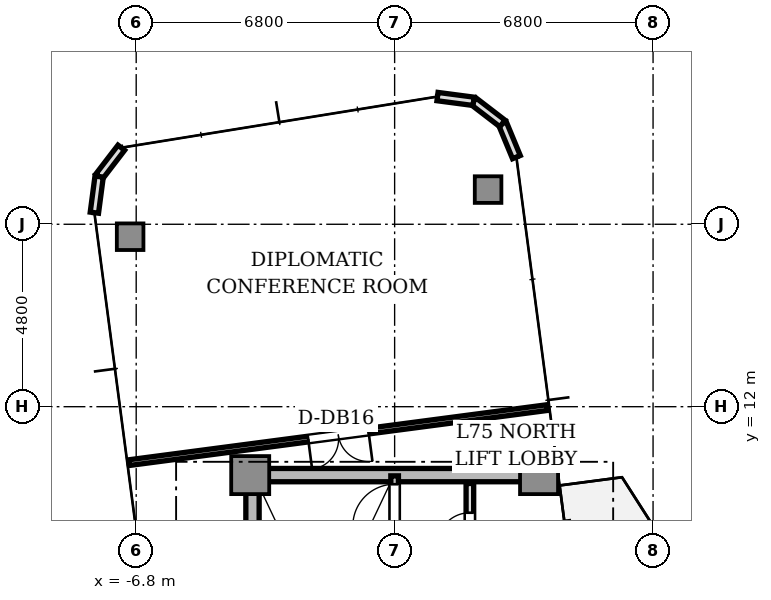
"""IFC4 building model, lengths in metres.
Left out: names, types, materials, properties, quantities, classifications, styles, units other than length and angle.
Written with IfcOpenShell. Run it as: python <this file> out.ifc"""

import sys

from ifc_helpers import new_model, si_unit, direction, frame, frame_2d, origin, origin_2d, place, context, subcontext, project, spatial, rectangle, extrude, source, transform, mapped, element, fill, save


model = new_model("IFC4")
c1 = context("Model", 3, precision=1e-05, world=origin(), true_north=direction((0.0, 1.0)))
c2 = subcontext(c1, "Body", "Model", "MODEL_VIEW")
j1 = project(units=[si_unit("LENGTHUNIT", "METRE"), si_unit("PLANEANGLEUNIT", "RADIAN")], contexts=[c1])
p1 = place(None, origin())
s1 = spatial("IfcSite", under=j1, at=p1, CompositionType="ELEMENT")
p2 = place(p1, origin())
s2 = spatial("IfcBuilding", under=s1, at=p2, CompositionType="ELEMENT")
p3 = place(p2, frame((0.0, 0.0, 269.1)))
s3 = spatial("IfcBuildingStorey", under=s2, at=p3, CompositionType="ELEMENT", Elevation=269.1)
p4 = place(p3, frame((-3.55, 10.2, 0.0), z_axis=(0.0, 0.0, 1.0), x_axis=(1.0, 0.0, 0.0)))
e1 = element("IfcWall", 1, at=p4, inside=s3, PredefinedType="SHEAR", context=c2, shape_type="SweptSolid", body=[
    extrude(rectangle(XDim=7.1, YDim=0.35, at=frame_2d((3.55, 0.0))), origin(), (0.0, 0.0, 1.0), 3.11),
])
p5 = place(p3, frame((-3.74, 2.85, 0.0), z_axis=(0.0, 0.0, 1.0), x_axis=(0.0, 1.0, 0.0)))
e2 = element("IfcWall", 2, at=p5, inside=s3, PredefinedType="SHEAR", context=c2, shape_type="SweptSolid", body=[
    extrude(rectangle(XDim=6.9, YDim=0.35, at=frame_2d((3.45, 0.0))), origin(), (0.0, 0.0, 1.0), 3.11),
])
m1 = source(origin(), c2, "Body", "SweptSolid", [
    extrude(rectangle(XDim=1.0, YDim=1.0, at=origin_2d()), origin(), (0.0, 0.0, 1.0), 3.11),
])
for number, where, z_axis, x_axis in (
    (3, (-3.8, 10.2, 0.0), (0.0, 0.0, 1.0), (1.0, 0.0, 0.0)),
    (4, (3.8, 10.2, 0.0), (0.0, 0.0, 1.0), (1.0, 0.0, 0.0)),
):
    element("IfcColumn", number, at=place(p3, frame(where, z_axis=z_axis, x_axis=x_axis)), inside=s3, PredefinedType="COLUMN", context=c2, shape_type="MappedRepresentation", body=[
        mapped(m1, transform((0.0, 0.0, 0.0), scale=1.0)),
    ])
m2 = source(origin(), c2, "Body", "SweptSolid", [
    extrude(rectangle(XDim=0.7, YDim=0.7, at=origin_2d()), origin(), (0.0, 0.0, 1.0), 3.11),
])
for number, where, z_axis, x_axis in (
    (5, (2.459, 17.712, 0.0), (0.0, 0.0, 1.0), (1.0, 0.0, 0.0)),
    (6, (-6.96, 16.472, 0.0), (0.0, 0.0, 1.0), (1.0, 0.0, 0.0)),
):
    element("IfcColumn", number, at=place(p3, frame(where, z_axis=z_axis, x_axis=x_axis)), inside=s3, PredefinedType="COLUMN", context=c2, shape_type="MappedRepresentation", body=[
        mapped(m2, transform((0.0, 0.0, 0.0), scale=1.0)),
    ])
p6 = place(p3, frame((3.204, 18.567, 0.0), z_axis=(0.0, 0.0, 1.0), x_axis=(-0.382569397359, 0.923926759112, 0.0)))
e7 = element("IfcWall", 7, at=p6, inside=s3, PredefinedType="STANDARD", context=c2, shape_type="SweptSolid", body=[
    extrude(rectangle(XDim=0.958, YDim=0.22, at=frame_2d((0.479, 0.0))), origin(), (0.0, 0.0, 1.0), 3.11),
])
for number, where, z_axis, x_axis in (
    (8, (2.837, 19.452, 0.0), (0.0, 0.0, 1.0), (-0.793, 0.609, 0.0)),
    (9, (2.078, 20.035, 0.0), (0.0, 0.0, 1.0), (-0.991, 0.131, 0.0)),
    (10, (-7.192, 18.814, 0.0), (0.0, 0.0, 1.0), (-0.609, -0.793, 0.0)),
):
    element("IfcWall", number, at=place(p3, frame(where, z_axis=z_axis, x_axis=x_axis)), inside=s3, PredefinedType="STANDARD", context=c2, shape_type="SweptSolid", body=[
        extrude(rectangle(XDim=0.958, YDim=0.22, at=frame_2d((0.479, 0.0))), origin(), (0.0, 0.0, 1.0), 3.11),
    ])
p7 = place(p3, frame((-7.775, 18.055, 0.0), z_axis=(0.0, 0.0, 1.0), x_axis=(-0.130494070426, -0.991449089759, 0.0)))
e11 = element("IfcWall", 11, at=p7, inside=s3, PredefinedType="STANDARD", context=c2, shape_type="SweptSolid", body=[
    extrude(rectangle(XDim=0.958, YDim=0.22, at=frame_2d((0.479, 0.0))), origin(), (0.0, 0.0, 1.0), 3.11),
])
p8 = place(p3, frame((0.0, 2.5, 0.0), z_axis=(0.0, 0.0, 1.0), x_axis=(0.0, 1.0, 0.0)))
e12 = element("IfcWall", 12, at=p8, inside=s3, PredefinedType="SOLIDWALL", context=c2, shape_type="SweptSolid", body=[
    extrude(rectangle(XDim=7.68, YDim=0.2, at=frame_2d((3.84, 0.0))), origin(), (0.0, 0.0, 1.0), 3.11),
])
p9 = place(p8, frame((6.36, 0.0, 0.0)))
e13 = element("IfcOpeningElement", 13, at=p9, cuts=e12, PredefinedType="OPENING", context=c2, shape_type="SweptSolid", body=[
    extrude(rectangle(XDim=1.1, YDim=2.15, at=frame_2d((0.55, 1.075))), frame((0.0, 0.11, 0.0), z_axis=(0.0, -1.0, 0.0), x_axis=(1.0, 0.0, 0.0)), (0.0, 0.0, 1.0), 0.22),
])
p10 = place(p3, frame((1.98, 5.32, 0.0), z_axis=(0.0, 0.0, 1.0), x_axis=(0.0, 1.0, 0.0)))
e14 = element("IfcWall", 14, at=p10, inside=s3, PredefinedType="SOLIDWALL", context=c2, shape_type="SweptSolid", body=[
    extrude(rectangle(XDim=4.66, YDim=0.2, at=frame_2d((2.33, 0.0))), origin(), (0.0, 0.0, 1.0), 2.66),
])
p11 = place(p10, frame((3.04, 0.0, 0.0)))
e15 = element("IfcOpeningElement", 15, at=p11, cuts=e14, PredefinedType="OPENING", context=c2, shape_type="SweptSolid", body=[
    extrude(rectangle(XDim=0.85, YDim=2.1, at=frame_2d((0.425, 1.05))), frame((0.0, 0.11, 0.0), z_axis=(0.0, -1.0, 0.0), x_axis=(1.0, 0.0, 0.0)), (0.0, 0.0, 1.0), 0.22),
])
p12 = place(p3, frame((4.021, 11.977, 0.0), z_axis=(0.0, 0.0, 1.0), x_axis=(-0.991445908749, -0.130518236368, 0.0)))
e16 = element("IfcWall", 16, at=p12, inside=s3, PredefinedType="PARTITIONING", context=c2, shape_type="SweptSolid", body=[
    extrude(rectangle(XDim=11.1, YDim=0.15, at=frame_2d((5.55, 0.0))), origin(), (0.0, 0.0, 1.0), 2.66),
])
p13 = place(p12, frame((4.75, 0.0, 0.0)))
e17 = element("IfcOpeningElement", 17, at=p13, cuts=e16, PredefinedType="OPENING", context=c2, shape_type="SweptSolid", body=[
    extrude(rectangle(XDim=1.6, YDim=2.25, at=frame_2d((0.8, 1.125))), frame((0.0, 0.085, 0.0), z_axis=(0.0, -1.0, 0.0), x_axis=(1.0, 0.0, 0.0)), (0.0, 0.0, 1.0), 0.17),
])
m3 = source(origin(), c2, "Body", "SweptSolid", [
    extrude(rectangle(XDim=1.1, YDim=0.05, at=origin_2d()), origin(), (0.0, 0.0, 1.0), 2.15),
])
p14 = place(p9, frame((0.55, 0.0, 0.0)))
e18 = element("IfcDoor", 18, at=p14, inside=s3, OperationType="SINGLE_SWING_LEFT", PredefinedType="DOOR", context=c2, shape_type="MappedRepresentation", body=[
    mapped(m3, transform((0.0, 0.0, 0.0), scale=1.0)),
])
fill(e13, e18)
m4 = source(origin(), c2, "Body", "SweptSolid", [
    extrude(rectangle(XDim=0.85, YDim=0.05, at=origin_2d()), origin(), (0.0, 0.0, 1.0), 2.1),
])
p15 = place(p11, frame((0.425, 0.0, 0.0)))
e19 = element("IfcDoor", 19, at=p15, inside=s3, OperationType="SINGLE_SWING_LEFT", PredefinedType="DOOR", context=c2, shape_type="MappedRepresentation", body=[
    mapped(m4, transform((0.0, 0.0, 0.0), scale=1.0)),
])
fill(e15, e19)
m5 = source(origin(), c2, "Body", "SweptSolid", [
    extrude(rectangle(XDim=1.6, YDim=0.05, at=origin_2d()), origin(), (0.0, 0.0, 1.0), 2.25),
])
p16 = place(p13, frame((0.8, 0.0, 0.0)))
e20 = element("IfcDoor", 20, at=p16, inside=s3, OperationType="DOUBLE_DOOR_SINGLE_SWING", PredefinedType="DOOR", context=c2, shape_type="MappedRepresentation", body=[
    mapped(m5, transform((0.0, 0.0, 0.0), scale=1.0)),
])
fill(e17, e20)
save(model, sys.argv[1])
